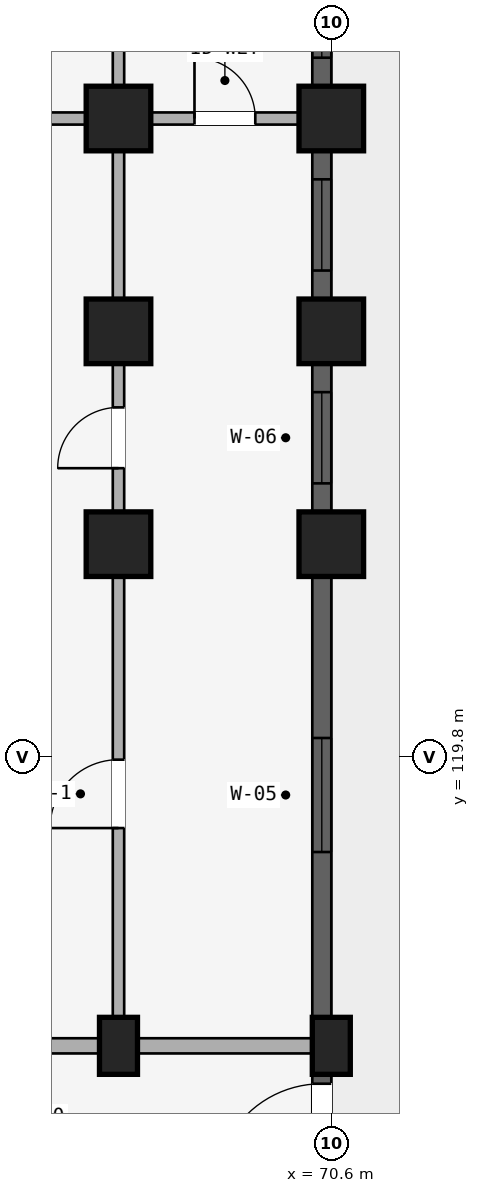
"""IFC4 building model, lengths in metres.
Left out: names, types, materials, properties, quantities, classifications, styles, units other than length and angle.
Written with IfcOpenShell. Run it as: python <this file> out.ifc"""

import sys

from ifc_helpers import new_model, si_unit, direction, frame, frame_2d, origin, origin_2d, place, context, subcontext, project, spatial, rectangle, extrude, element, fill, save


model = new_model("IFC4")
c1 = context("Model", 3, precision=1e-05, world=origin(), true_north=direction((0.0, 1.0)))
c2 = subcontext(c1, "Body", "Model", "MODEL_VIEW")
j1 = project(units=[si_unit("LENGTHUNIT", "METRE"), si_unit("PLANEANGLEUNIT", "RADIAN")], contexts=[c1])
p1 = place(None, origin())
s1 = spatial("IfcSite", under=j1, at=p1, CompositionType="ELEMENT")
p2 = place(p1, origin())
s2 = spatial("IfcBuilding", under=s1, at=p2, CompositionType="ELEMENT")
p3 = place(p2, origin())
s3 = spatial("IfcBuildingStorey", under=s2, at=p3, CompositionType="ELEMENT", Elevation=0.0)
p4 = place(p3, frame((67.8, 116.0, 0.0), z_axis=(0.0, 0.0, 1.0), x_axis=(1.0, 0.0, 0.0)))
e1 = element("IfcColumn", 1, at=p4, inside=s3, PredefinedType="COLUMN", context=c2, shape_type="SweptSolid", body=[
    extrude(rectangle(XDim=0.5, YDim=0.75, at=origin_2d()), origin(), (0.0, 0.0, 1.0), 4.15),
])
for number, where, z_axis, x_axis in (
    (2, (67.8, 122.6, 0.0), (0.0, 0.0, 1.0), (1.0, 0.0, 0.0)),
    (3, (67.8, 125.4, 0.0), (0.0, 0.0, 1.0), (1.0, 0.0, 0.0)),
    (4, (67.8, 128.2, 0.0), (0.0, 0.0, 1.0), (1.0, 0.0, 0.0)),
):
    element("IfcColumn", number, at=place(p3, frame(where, z_axis=z_axis, x_axis=x_axis)), inside=s3, PredefinedType="COLUMN", context=c2, shape_type="SweptSolid", body=[
        extrude(rectangle(XDim=0.85, YDim=0.85, at=origin_2d()), origin(), (0.0, 0.0, 1.0), 4.15),
    ])
p5 = place(p3, frame((70.6, 116.0, 0.0), z_axis=(0.0, 0.0, 1.0), x_axis=(1.0, 0.0, 0.0)))
e5 = element("IfcColumn", 5, at=p5, inside=s3, PredefinedType="COLUMN", context=c2, shape_type="SweptSolid", body=[
    extrude(rectangle(XDim=0.5, YDim=0.75, at=origin_2d()), origin(), (0.0, 0.0, 1.0), 4.15),
])
for number, where, z_axis, x_axis in (
    (6, (70.6, 122.6, 0.0), (0.0, 0.0, 1.0), (1.0, 0.0, 0.0)),
    (7, (70.6, 125.4, 0.0), (0.0, 0.0, 1.0), (1.0, 0.0, 0.0)),
    (8, (70.6, 128.2, 0.0), (0.0, 0.0, 1.0), (1.0, 0.0, 0.0)),
):
    element("IfcColumn", number, at=place(p3, frame(where, z_axis=z_axis, x_axis=x_axis)), inside=s3, PredefinedType="COLUMN", context=c2, shape_type="SweptSolid", body=[
        extrude(rectangle(XDim=0.85, YDim=0.85, at=origin_2d()), origin(), (0.0, 0.0, 1.0), 4.15),
    ])
p6 = place(p3, frame((65.0, 116.0, 0.0), z_axis=(0.0, 0.0, 1.0), x_axis=(1.0, 0.0, 0.0)))
e9 = element("IfcWall", 9, at=p6, inside=s3, PredefinedType="STANDARD", context=c2, shape_type="SweptSolid", body=[
    extrude(rectangle(XDim=2.8, YDim=0.2, at=frame_2d((1.4, 0.0))), origin(), (0.0, 0.0, 1.0), 3.492),
])
p7 = place(p6, frame((0.9, 0.0, 0.0)))
e10 = element("IfcOpeningElement", 10, at=p7, cuts=e9, PredefinedType="OPENING", context=c2, shape_type="SweptSolid", body=[
    extrude(rectangle(XDim=1.0, YDim=2.15, at=frame_2d((0.5, 1.075))), frame((0.0, 0.11, 0.0), z_axis=(0.0, -1.0, 0.0), x_axis=(1.0, 0.0, 0.0)), (0.0, 0.0, 1.0), 0.22),
])
p8 = place(p3, frame((65.08, 128.2, 0.0), z_axis=(0.0, 0.0, 1.0), x_axis=(1.0, 0.0, 0.0)))
e11 = element("IfcWall", 11, at=p8, inside=s3, PredefinedType="PLUMBINGWALL", context=c2, shape_type="SweptSolid", body=[
    extrude(rectangle(XDim=2.64, YDim=0.16, at=frame_2d((1.32, 0.0))), origin(), (0.0, 0.0, 1.0), 3.492),
])
p9 = place(p8, frame((0.87, 0.0, 0.0)))
e12 = element("IfcOpeningElement", 12, at=p9, cuts=e11, PredefinedType="OPENING", context=c2, shape_type="SweptSolid", body=[
    extrude(rectangle(XDim=0.9, YDim=2.1, at=frame_2d((0.45, 1.05))), frame((0.0, 0.09, 0.0), z_axis=(0.0, -1.0, 0.0), x_axis=(1.0, 0.0, 0.0)), (0.0, 0.0, 1.0), 0.18),
])
p10 = place(p3, frame((67.8, 116.0, 0.0), z_axis=(0.0, 0.0, 1.0), x_axis=(1.0, 0.0, 0.0)))
e13 = element("IfcWall", 13, at=p10, inside=s3, PredefinedType="STANDARD", context=c2, shape_type="SweptSolid", body=[
    extrude(rectangle(XDim=2.8, YDim=0.2, at=frame_2d((1.4, 0.0))), origin(), (0.0, 0.0, 1.0), 3.492),
])
p11 = place(p3, frame((67.88, 128.2, 0.0), z_axis=(0.0, 0.0, 1.0), x_axis=(1.0, 0.0, 0.0)))
e14 = element("IfcWall", 14, at=p11, inside=s3, PredefinedType="PLUMBINGWALL", context=c2, shape_type="SweptSolid", body=[
    extrude(rectangle(XDim=2.64, YDim=0.16, at=frame_2d((1.32, 0.0))), origin(), (0.0, 0.0, 1.0), 3.492),
])
p12 = place(p11, frame((0.92, 0.0, 0.0)))
e15 = element("IfcOpeningElement", 15, at=p12, cuts=e14, PredefinedType="OPENING", context=c2, shape_type="SweptSolid", body=[
    extrude(rectangle(XDim=0.8, YDim=2.1, at=frame_2d((0.4, 1.05))), frame((0.0, 0.09, 0.0), z_axis=(0.0, -1.0, 0.0), x_axis=(1.0, 0.0, 0.0)), (0.0, 0.0, 1.0), 0.18),
])
p13 = place(p3, frame((67.8, 116.05, 0.0), z_axis=(0.0, 0.0, 1.0), x_axis=(0.0, 1.0, 0.0)))
e16 = element("IfcWall", 16, at=p13, inside=s3, PredefinedType="PARTITIONING", context=c2, shape_type="SweptSolid", body=[
    extrude(rectangle(XDim=6.53, YDim=0.15, at=frame_2d((3.265, 0.0))), origin(), (0.0, 0.0, 1.0), 3.492),
])
p14 = place(p13, frame((2.815, 0.0, 0.0)))
e17 = element("IfcOpeningElement", 17, at=p14, cuts=e16, PredefinedType="OPENING", context=c2, shape_type="SweptSolid", body=[
    extrude(rectangle(XDim=0.9, YDim=2.1, at=frame_2d((0.45, 1.05))), frame((0.0, 0.085, 0.0), z_axis=(0.0, -1.0, 0.0), x_axis=(1.0, 0.0, 0.0)), (0.0, 0.0, 1.0), 0.17),
])
p15 = place(p3, frame((67.8, 122.7, 0.0), z_axis=(0.0, 0.0, 1.0), x_axis=(0.0, 1.0, 0.0)))
e18 = element("IfcWall", 18, at=p15, inside=s3, PredefinedType="PARTITIONING", context=c2, shape_type="SweptSolid", body=[
    extrude(rectangle(XDim=10.82, YDim=0.15, at=frame_2d((5.41, 0.0))), origin(), (0.0, 0.0, 1.0), 3.492),
])
p16 = place(p15, frame((0.899, 0.0, 0.0)))
e19 = element("IfcOpeningElement", 19, at=p16, cuts=e18, PredefinedType="OPENING", context=c2, shape_type="SweptSolid", body=[
    extrude(rectangle(XDim=0.8, YDim=2.1, at=frame_2d((0.4, 1.05))), frame((0.0, 0.085, 0.0), z_axis=(0.0, -1.0, 0.0), x_axis=(1.0, 0.0, 0.0)), (0.0, 0.0, 1.0), 0.17),
])
p17 = place(p3, frame((70.475, 113.979, 0.0), z_axis=(0.0, 0.0, 1.0), x_axis=(0.0, 1.0, 0.0)))
e20 = element("IfcWall", 20, at=p17, inside=s3, PredefinedType="STANDARD", context=c2, shape_type="SweptSolid", body=[
    extrude(rectangle(XDim=1.643, YDim=0.25, at=frame_2d((0.822, 0.0))), origin(), (0.0, 0.0, 1.0), 3.492),
])
p18 = place(p17, frame((0.123, 0.0, 0.0)))
e21 = element("IfcOpeningElement", 21, at=p18, cuts=e20, PredefinedType="OPENING", context=c2, shape_type="SweptSolid", body=[
    extrude(rectangle(XDim=1.4, YDim=2.15, at=frame_2d((0.7, 1.075))), frame((0.0, 0.135, 0.0), z_axis=(0.0, -1.0, 0.0), x_axis=(1.0, 0.0, 0.0)), (0.0, 0.0, 1.0), 0.27),
])
p19 = place(p3, frame((70.475, 116.378, 0.0), z_axis=(0.0, 0.0, 1.0), x_axis=(0.0, 1.0, 0.0)))
e22 = element("IfcWall", 22, at=p19, inside=s3, PredefinedType="STANDARD", context=c2, shape_type="SweptSolid", body=[
    extrude(rectangle(XDim=5.802, YDim=0.25, at=frame_2d((2.901, 0.0))), origin(), (0.0, 0.0, 1.0), 3.492),
])
p20 = place(p19, frame((2.171, 0.0, 0.88)))
e23 = element("IfcOpeningElement", 23, at=p20, cuts=e22, PredefinedType="OPENING", context=c2, shape_type="SweptSolid", body=[
    extrude(rectangle(XDim=1.5, YDim=1.65, at=frame_2d((0.75, 0.825))), frame((0.0, 0.135, 0.0), z_axis=(0.0, -1.0, 0.0), x_axis=(1.0, 0.0, 0.0)), (0.0, 0.0, 1.0), 0.27),
])
p21 = place(p3, frame((70.475, 123.02, 0.0), z_axis=(0.0, 0.0, 1.0), x_axis=(0.0, 1.0, 0.0)))
e24 = element("IfcWall", 24, at=p21, inside=s3, PredefinedType="STANDARD", context=c2, shape_type="SweptSolid", body=[
    extrude(rectangle(XDim=1.96, YDim=0.25, at=frame_2d((0.98, 0.0))), origin(), (0.0, 0.0, 1.0), 3.492),
])
p22 = place(p21, frame((0.38, 0.0, 0.88)))
e25 = element("IfcOpeningElement", 25, at=p22, cuts=e24, PredefinedType="OPENING", context=c2, shape_type="SweptSolid", body=[
    extrude(rectangle(XDim=1.2, YDim=1.5, at=frame_2d((0.6, 0.75))), frame((0.0, 0.135, 0.0), z_axis=(0.0, -1.0, 0.0), x_axis=(1.0, 0.0, 0.0)), (0.0, 0.0, 1.0), 0.27),
])
p23 = place(p3, frame((70.475, 125.82, 0.0), z_axis=(0.0, 0.0, 1.0), x_axis=(0.0, 1.0, 0.0)))
e26 = element("IfcWall", 26, at=p23, inside=s3, PredefinedType="STANDARD", context=c2, shape_type="SweptSolid", body=[
    extrude(rectangle(XDim=1.96, YDim=0.25, at=frame_2d((0.98, 0.0))), origin(), (0.0, 0.0, 1.0), 3.492),
])
p24 = place(p23, frame((0.38, 0.0, 0.88)))
e27 = element("IfcOpeningElement", 27, at=p24, cuts=e26, PredefinedType="OPENING", context=c2, shape_type="SweptSolid", body=[
    extrude(rectangle(XDim=1.2, YDim=1.5, at=frame_2d((0.6, 0.75))), frame((0.0, 0.135, 0.0), z_axis=(0.0, -1.0, 0.0), x_axis=(1.0, 0.0, 0.0)), (0.0, 0.0, 1.0), 0.27),
])
p25 = place(p3, frame((70.475, 128.62, 0.0), z_axis=(0.0, 0.0, 1.0), x_axis=(0.0, 1.0, 0.0)))
e28 = element("IfcWall", 28, at=p25, inside=s3, PredefinedType="STANDARD", context=c2, shape_type="SweptSolid", body=[
    extrude(rectangle(XDim=1.96, YDim=0.25, at=frame_2d((0.98, 0.0))), origin(), (0.0, 0.0, 1.0), 3.492),
])
p26 = place(p25, frame((0.38, 0.0, 0.88)))
e29 = element("IfcOpeningElement", 29, at=p26, cuts=e28, PredefinedType="OPENING", context=c2, shape_type="SweptSolid", body=[
    extrude(rectangle(XDim=1.2, YDim=1.5, at=frame_2d((0.6, 0.75))), frame((0.0, 0.135, 0.0), z_axis=(0.0, -1.0, 0.0), x_axis=(1.0, 0.0, 0.0)), (0.0, 0.0, 1.0), 0.27),
])
p27 = place(p20, origin())
e30 = element("IfcWindow", 30, at=p27, inside=s3, PartitioningType="DOUBLE_PANEL_VERTICAL", PredefinedType="WINDOW", context=c2, shape_type="SweptSolid", body=[
    extrude(rectangle(XDim=1.5, YDim=1.65, at=frame_2d((0.75, 0.825))), frame((0.0, 0.03, 0.0), z_axis=(0.0, -1.0, 0.0), x_axis=(1.0, 0.0, 0.0)), (0.0, 0.0, 1.0), 0.06),
])
fill(e23, e30)
p28 = place(p22, origin())
e31 = element("IfcWindow", 31, at=p28, inside=s3, PartitioningType="SINGLE_PANEL", PredefinedType="WINDOW", context=c2, shape_type="SweptSolid", body=[
    extrude(rectangle(XDim=1.2, YDim=1.5, at=frame_2d((0.6, 0.75))), frame((0.0, 0.03, 0.0), z_axis=(0.0, -1.0, 0.0), x_axis=(1.0, 0.0, 0.0)), (0.0, 0.0, 1.0), 0.06),
])
fill(e25, e31)
p29 = place(p24, origin())
e32 = element("IfcWindow", 32, at=p29, inside=s3, PartitioningType="SINGLE_PANEL", PredefinedType="WINDOW", context=c2, shape_type="SweptSolid", body=[
    extrude(rectangle(XDim=1.2, YDim=1.5, at=frame_2d((0.6, 0.75))), frame((0.0, 0.03, 0.0), z_axis=(0.0, -1.0, 0.0), x_axis=(1.0, 0.0, 0.0)), (0.0, 0.0, 1.0), 0.06),
])
fill(e27, e32)
p30 = place(p26, origin())
e33 = element("IfcWindow", 33, at=p30, inside=s3, PartitioningType="SINGLE_PANEL", PredefinedType="WINDOW", context=c2, shape_type="SweptSolid", body=[
    extrude(rectangle(XDim=1.2, YDim=1.5, at=frame_2d((0.6, 0.75))), frame((0.0, 0.03, 0.0), z_axis=(0.0, -1.0, 0.0), x_axis=(1.0, 0.0, 0.0)), (0.0, 0.0, 1.0), 0.06),
])
fill(e29, e33)
p31 = place(p12, frame((0.8, 0.0, 0.0), z_axis=(0.0, 0.0, 1.0), x_axis=(-1.0, 0.0, 0.0)))
e34 = element("IfcDoor", 34, at=p31, inside=s3, OperationType="SINGLE_SWING_RIGHT", PredefinedType="DOOR", context=c2, shape_type="SweptSolid", body=[
    extrude(rectangle(XDim=0.8, YDim=2.1, at=frame_2d((0.4, 1.05))), frame((0.0, 0.025, 0.0), z_axis=(0.0, -1.0, 0.0), x_axis=(1.0, 0.0, 0.0)), (0.0, 0.0, 1.0), 0.05),
])
fill(e15, e34)
p32 = place(p14, frame((0.9, 0.0, 0.0), z_axis=(0.0, 0.0, 1.0), x_axis=(-1.0, 0.0, 0.0)))
e35 = element("IfcDoor", 35, at=p32, inside=s3, OperationType="SINGLE_SWING_RIGHT", PredefinedType="DOOR", context=c2, shape_type="SweptSolid", body=[
    extrude(rectangle(XDim=0.9, YDim=2.1, at=frame_2d((0.45, 1.05))), frame((0.0, 0.025, 0.0), z_axis=(0.0, -1.0, 0.0), x_axis=(1.0, 0.0, 0.0)), (0.0, 0.0, 1.0), 0.05),
])
fill(e17, e35)
p33 = place(p16, origin())
e36 = element("IfcDoor", 36, at=p33, inside=s3, OperationType="SINGLE_SWING_LEFT", PredefinedType="DOOR", context=c2, shape_type="SweptSolid", body=[
    extrude(rectangle(XDim=0.8, YDim=2.1, at=frame_2d((0.4, 1.05))), frame((0.0, 0.025, 0.0), z_axis=(0.0, -1.0, 0.0), x_axis=(1.0, 0.0, 0.0)), (0.0, 0.0, 1.0), 0.05),
])
fill(e19, e36)
p34 = place(p18, frame((1.4, 0.0, 0.0), z_axis=(0.0, 0.0, 1.0), x_axis=(-1.0, 0.0, 0.0)))
e37 = element("IfcDoor", 37, at=p34, inside=s3, OperationType="SINGLE_SWING_RIGHT", PredefinedType="DOOR", context=c2, shape_type="SweptSolid", body=[
    extrude(rectangle(XDim=1.4, YDim=2.15, at=frame_2d((0.7, 1.075))), frame((0.0, 0.025, 0.0), z_axis=(0.0, -1.0, 0.0), x_axis=(1.0, 0.0, 0.0)), (0.0, 0.0, 1.0), 0.05),
])
fill(e21, e37)
save(model, sys.argv[1])
